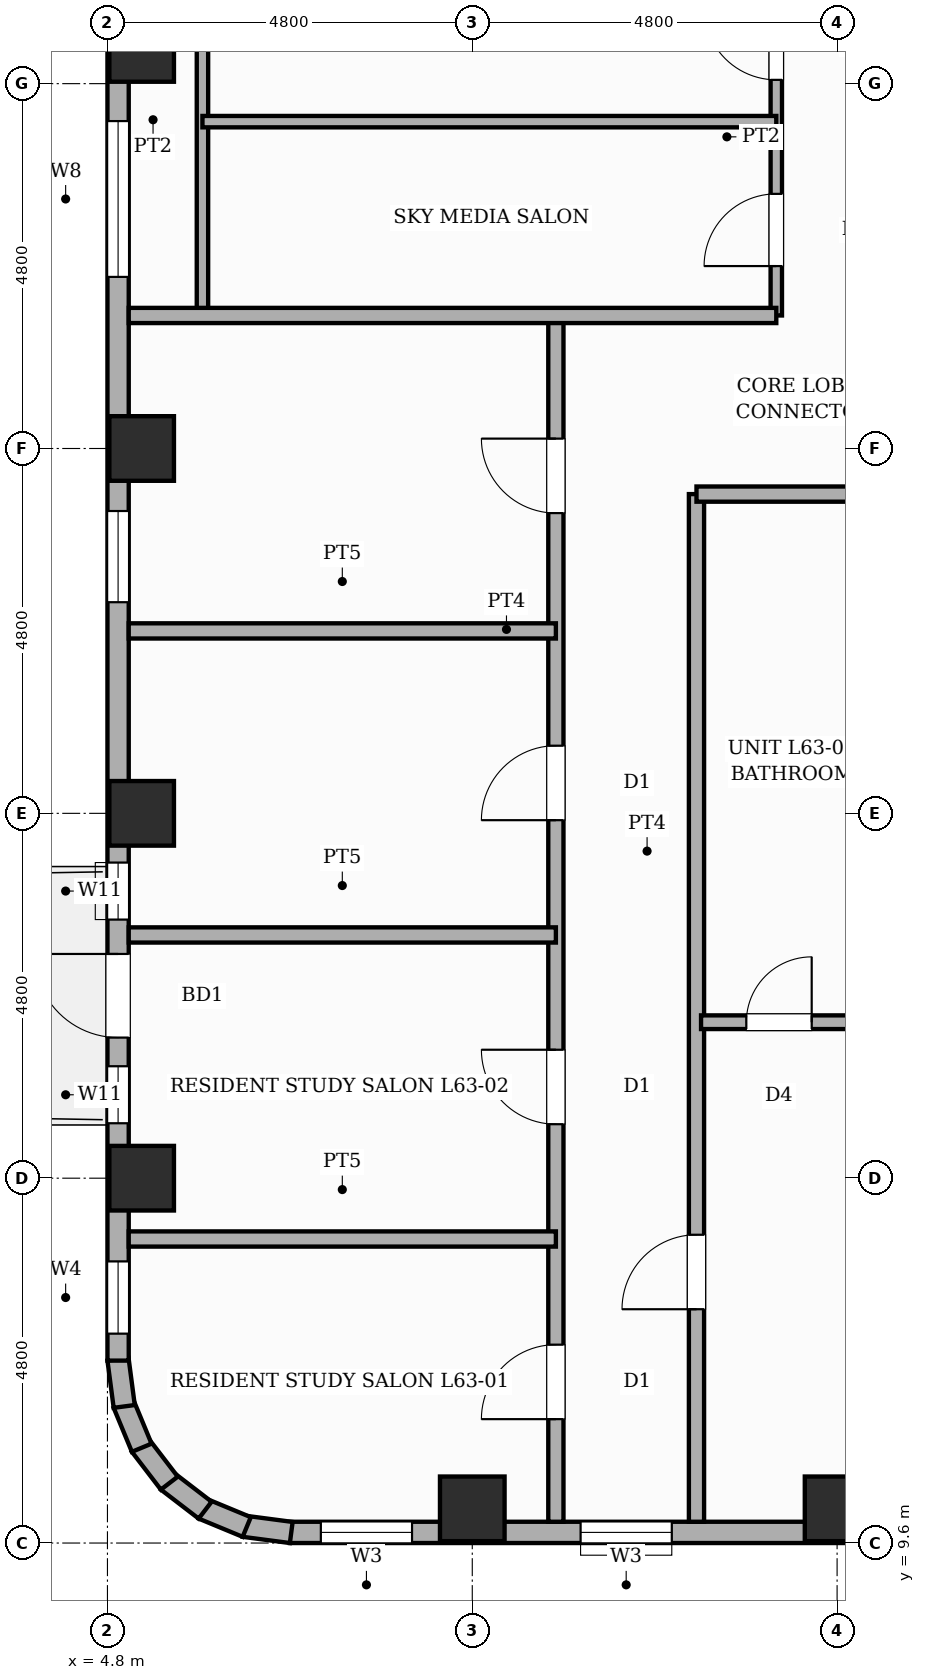
"""IFC4 building model, lengths in metres.
Left out: names, types, materials, properties, quantities, classifications, styles, units other than length and angle.
Written with IfcOpenShell. Run it as: python <this file> out.ifc"""

import sys

from ifc_helpers import new_model, si_unit, direction, frame, frame_2d, origin, origin_2d, place, context, subcontext, project, spatial, rectangle, extrude, element, fill, save


model = new_model("IFC4")
c1 = context("Model", 3, precision=1e-05, world=origin(), true_north=direction((0.0, 1.0)))
c2 = subcontext(c1, "Body", "Model", "MODEL_VIEW")
j1 = project(units=[si_unit("LENGTHUNIT", "METRE"), si_unit("PLANEANGLEUNIT", "RADIAN")], contexts=[c1])
p1 = place(None, origin())
s1 = spatial("IfcSite", under=j1, at=p1, CompositionType="ELEMENT")
p2 = place(p1, origin())
s2 = spatial("IfcBuilding", under=s1, at=p2, CompositionType="ELEMENT")
p3 = place(p2, frame((0.0, 0.0, 239.8)))
s3 = spatial("IfcBuildingStorey", under=s2, at=p3, CompositionType="ELEMENT", Elevation=239.8)
for number, where, z_axis, x_axis in (
    (1, (5.25, 14.4, 0.0), (0.0, 0.0, 1.0), (1.0, 0.0, 0.0)),
    (2, (5.25, 19.2, 0.0), (0.0, 0.0, 1.0), (1.0, 0.0, 0.0)),
    (3, (5.25, 24.0, 0.0), (0.0, 0.0, 1.0), (1.0, 0.0, 0.0)),
    (4, (5.25, 29.25, 0.0), (0.0, 0.0, 1.0), (1.0, 0.0, 0.0)),
    (5, (9.6, 10.05, 0.0), (0.0, 0.0, 1.0), (1.0, 0.0, 0.0)),
    (6, (14.4, 10.05, 0.0), (0.0, 0.0, 1.0), (1.0, 0.0, 0.0)),
):
    element("IfcColumn", number, at=place(p3, frame(where, z_axis=z_axis, x_axis=x_axis)), inside=s3, PredefinedType="COLUMN", context=c2, shape_type="SweptSolid", body=[
        extrude(rectangle(XDim=0.85, YDim=0.85, at=origin_2d()), origin(), (0.0, 0.0, 1.0), 4.3),
    ])
p4 = place(p3, frame((21.6, 9.74, 0.0), z_axis=(0.0, 0.0, 1.0), x_axis=(-1.0, 0.0, 0.0)))
e7 = element("IfcWall", 7, at=p4, inside=s3, PredefinedType="STANDARD", context=c2, shape_type="SweptSolid", body=[
    extrude(rectangle(XDim=14.4, YDim=0.28, at=frame_2d((7.2, 0.0))), origin(), (0.0, 0.0, 1.0), 3.32),
])
p5 = place(p4, frame((9.375, 0.0, 0.8)))
e8 = element("IfcOpeningElement", 8, at=p5, cuts=e7, PredefinedType="OPENING", context=c2, shape_type="SweptSolid", body=[
    extrude(rectangle(XDim=1.2, YDim=1.8, at=frame_2d((0.6, 0.9))), frame((0.0, 0.15, 0.0), z_axis=(0.0, -1.0, 0.0), x_axis=(1.0, 0.0, 0.0)), (0.0, 0.0, 1.0), 0.3),
])
p6 = place(p4, frame((12.792, 0.0, 0.8)))
e9 = element("IfcOpeningElement", 9, at=p6, cuts=e7, PredefinedType="OPENING", context=c2, shape_type="SweptSolid", body=[
    extrude(rectangle(XDim=1.2, YDim=1.8, at=frame_2d((0.6, 0.9))), frame((0.0, 0.15, 0.0), z_axis=(0.0, -1.0, 0.0), x_axis=(1.0, 0.0, 0.0)), (0.0, 0.0, 1.0), 0.3),
])
p7 = place(p4, frame((4.749, 0.0, 0.8)))
e10 = element("IfcOpeningElement", 10, at=p7, cuts=e7, PredefinedType="OPENING", context=c2, shape_type="SweptSolid", body=[
    extrude(rectangle(XDim=1.65, YDim=1.95, at=frame_2d((0.825, 0.975))), frame((0.0, 0.15, 0.0), z_axis=(0.0, -1.0, 0.0), x_axis=(1.0, 0.0, 0.0)), (0.0, 0.0, 1.0), 0.3),
])
p8 = place(p4, frame((0.407, 0.0, 0.8)))
e11 = element("IfcOpeningElement", 11, at=p8, cuts=e7, PredefinedType="OPENING", context=c2, shape_type="SweptSolid", body=[
    extrude(rectangle(XDim=1.2, YDim=1.8, at=frame_2d((0.6, 0.9))), frame((0.0, 0.15, 0.0), z_axis=(0.0, -1.0, 0.0), x_axis=(1.0, 0.0, 0.0)), (0.0, 0.0, 1.0), 0.3),
])
p9 = place(p3, frame((7.218, 9.739, 0.0), z_axis=(0.0, 0.0, 1.0), x_axis=(-0.9914410257, 0.130555323746, 0.0)))
e12 = element("IfcWall", 12, at=p9, inside=s3, PredefinedType="STANDARD", context=c2, shape_type="SweptSolid", body=[
    extrude(rectangle(XDim=0.626, YDim=0.28, at=frame_2d((0.313, 0.0))), origin(), (0.0, 0.0, 1.0), 4.04),
])
p10 = place(p3, frame((6.632, 9.811, 0.0), z_axis=(0.0, 0.0, 1.0), x_axis=(-0.923836271867, 0.382787856107, 0.0)))
e13 = element("IfcWall", 13, at=p10, inside=s3, PredefinedType="STANDARD", context=c2, shape_type="SweptSolid", body=[
    extrude(rectangle(XDim=0.626, YDim=0.28, at=frame_2d((0.313, 0.0))), origin(), (0.0, 0.0, 1.0), 4.04),
])
for number, where, z_axis, x_axis in (
    (14, (6.085, 10.033, 0.0), (0.0, 0.0, 1.0), (-0.793, 0.609, 0.0)),
    (15, (5.614, 10.388, 0.0), (0.0, 0.0, 1.0), (-0.609, 0.793, 0.0)),
    (16, (5.251, 10.854, 0.0), (0.0, 0.0, 1.0), (-0.383, 0.924, 0.0)),
    (17, (5.021, 11.397, 0.0), (0.0, 0.0, 1.0), (-0.131, 0.991, 0.0)),
):
    element("IfcWall", number, at=place(p3, frame(where, z_axis=z_axis, x_axis=x_axis)), inside=s3, PredefinedType="STANDARD", context=c2, shape_type="SweptSolid", body=[
        extrude(rectangle(XDim=0.626, YDim=0.28, at=frame_2d((0.313, 0.0))), origin(), (0.0, 0.0, 1.0), 4.04),
    ])
p11 = place(p3, frame((4.94, 12.0, 0.0), z_axis=(0.0, 0.0, 1.0), x_axis=(0.0, 1.0, 0.0)))
e18 = element("IfcWall", 18, at=p11, inside=s3, PredefinedType="STANDARD", context=c2, shape_type="SweptSolid", body=[
    extrude(rectangle(XDim=33.6, YDim=0.28, at=frame_2d((16.8, 0.0))), origin(), (0.0, 0.0, 1.0), 3.32),
])
p12 = place(p11, frame((4.25, 0.0, 0.0)))
e19 = element("IfcOpeningElement", 19, at=p12, cuts=e18, PredefinedType="OPENING", context=c2, shape_type="SweptSolid", body=[
    extrude(rectangle(XDim=1.1, YDim=2.15, at=frame_2d((0.55, 1.075))), frame((0.0, 0.15, 0.0), z_axis=(0.0, -1.0, 0.0), x_axis=(1.0, 0.0, 0.0)), (0.0, 0.0, 1.0), 0.3),
])
p13 = place(p11, frame((0.355, 0.0, 0.8)))
e20 = element("IfcOpeningElement", 20, at=p13, cuts=e18, PredefinedType="OPENING", context=c2, shape_type="SweptSolid", body=[
    extrude(rectangle(XDim=0.95, YDim=1.8, at=frame_2d((0.475, 0.9))), frame((0.0, 0.15, 0.0), z_axis=(0.0, -1.0, 0.0), x_axis=(1.0, 0.0, 0.0)), (0.0, 0.0, 1.0), 0.3),
])
p14 = place(p11, frame((3.123, 0.0, 0.45)))
e21 = element("IfcOpeningElement", 21, at=p14, cuts=e18, PredefinedType="OPENING", context=c2, shape_type="SweptSolid", body=[
    extrude(rectangle(XDim=0.75, YDim=1.8, at=frame_2d((0.375, 0.9))), frame((0.0, 0.15, 0.0), z_axis=(0.0, -1.0, 0.0), x_axis=(1.0, 0.0, 0.0)), (0.0, 0.0, 1.0), 0.3),
])
p15 = place(p11, frame((5.802, 0.0, 0.45)))
e22 = element("IfcOpeningElement", 22, at=p15, cuts=e18, PredefinedType="OPENING", context=c2, shape_type="SweptSolid", body=[
    extrude(rectangle(XDim=0.75, YDim=1.8, at=frame_2d((0.375, 0.9))), frame((0.0, 0.15, 0.0), z_axis=(0.0, -1.0, 0.0), x_axis=(1.0, 0.0, 0.0)), (0.0, 0.0, 1.0), 0.3),
])
p16 = place(p11, frame((9.978, 0.0, 0.8)))
e23 = element("IfcOpeningElement", 23, at=p16, cuts=e18, PredefinedType="OPENING", context=c2, shape_type="SweptSolid", body=[
    extrude(rectangle(XDim=1.2, YDim=1.8, at=frame_2d((0.6, 0.9))), frame((0.0, 0.15, 0.0), z_axis=(0.0, -1.0, 0.0), x_axis=(1.0, 0.0, 0.0)), (0.0, 0.0, 1.0), 0.3),
])
p17 = place(p11, frame((14.258, 0.0, 0.8)))
e24 = element("IfcOpeningElement", 24, at=p17, cuts=e18, PredefinedType="OPENING", context=c2, shape_type="SweptSolid", body=[
    extrude(rectangle(XDim=2.05, YDim=1.95, at=frame_2d((1.025, 0.975))), frame((0.0, 0.15, 0.0), z_axis=(0.0, -1.0, 0.0), x_axis=(1.0, 0.0, 0.0)), (0.0, 0.0, 1.0), 0.3),
])
p18 = place(p3, frame((13.6, 25.75, 0.0), z_axis=(0.0, 0.0, 1.0), x_axis=(0.0, 1.0, 0.0)))
e25 = element("IfcWall", 25, at=p18, inside=s3, PredefinedType="PARTITIONING", context=c2, shape_type="SweptSolid", body=[
    extrude(rectangle(XDim=5.15, YDim=0.15, at=frame_2d((2.575, 0.0))), origin(), (0.0, 0.0, 1.0), 4.04),
])
p19 = place(p18, frame((0.65, 0.0, 0.0)))
e26 = element("IfcOpeningElement", 26, at=p19, cuts=e25, PredefinedType="OPENING", context=c2, shape_type="SweptSolid", body=[
    extrude(rectangle(XDim=0.95, YDim=2.15, at=frame_2d((0.475, 1.075))), frame((0.0, 0.085, 0.0), z_axis=(0.0, -1.0, 0.0), x_axis=(1.0, 0.0, 0.0)), (0.0, 0.0, 1.0), 0.17),
])
p20 = place(p18, frame((3.1, 0.0, 0.0)))
e27 = element("IfcOpeningElement", 27, at=p20, cuts=e25, PredefinedType="OPENING", context=c2, shape_type="SweptSolid", body=[
    extrude(rectangle(XDim=0.95, YDim=2.15, at=frame_2d((0.475, 1.075))), frame((0.0, 0.085, 0.0), z_axis=(0.0, -1.0, 0.0), x_axis=(1.0, 0.0, 0.0)), (0.0, 0.0, 1.0), 0.17),
])
p21 = place(p3, frame((6.05, 25.75, 0.0), z_axis=(0.0, 0.0, 1.0), x_axis=(0.0, 1.0, 0.0)))
e28 = element("IfcWall", 28, at=p21, inside=s3, PredefinedType="PARTITIONING", context=c2, shape_type="SweptSolid", body=[
    extrude(rectangle(XDim=5.15, YDim=0.15, at=frame_2d((2.575, 0.0))), origin(), (0.0, 0.0, 1.0), 4.04),
])
p22 = place(p3, frame((6.05, 28.3, 0.0), z_axis=(0.0, 0.0, 1.0), x_axis=(1.0, 0.0, 0.0)))
e29 = element("IfcWall", 29, at=p22, inside=s3, PredefinedType="PARTITIONING", context=c2, shape_type="SweptSolid", body=[
    extrude(rectangle(XDim=7.55, YDim=0.15, at=frame_2d((3.775, 0.0))), origin(), (0.0, 0.0, 1.0), 4.04),
])
p23 = place(p3, frame((10.7, 9.88, 0.0), z_axis=(0.0, 0.0, 1.0), x_axis=(0.0, 1.0, 0.0)))
e30 = element("IfcWall", 30, at=p23, inside=s3, PredefinedType="PARTITIONING", context=c2, shape_type="SweptSolid", body=[
    extrude(rectangle(XDim=15.87, YDim=0.2, at=frame_2d((7.935, 0.0))), origin(), (0.0, 0.0, 1.0), 4.04),
])
p24 = place(p23, frame((1.35, 0.0, 0.0)))
e31 = element("IfcOpeningElement", 31, at=p24, cuts=e30, PredefinedType="OPENING", context=c2, shape_type="SweptSolid", body=[
    extrude(rectangle(XDim=0.98, YDim=2.18, at=frame_2d((0.49, 1.09))), frame((0.0, 0.11, 0.0), z_axis=(0.0, -1.0, 0.0), x_axis=(1.0, 0.0, 0.0)), (0.0, 0.0, 1.0), 0.22),
])
p25 = place(p23, frame((5.23, 0.0, 0.0)))
e32 = element("IfcOpeningElement", 32, at=p25, cuts=e30, PredefinedType="OPENING", context=c2, shape_type="SweptSolid", body=[
    extrude(rectangle(XDim=0.98, YDim=2.18, at=frame_2d((0.49, 1.09))), frame((0.0, 0.11, 0.0), z_axis=(0.0, -1.0, 0.0), x_axis=(1.0, 0.0, 0.0)), (0.0, 0.0, 1.0), 0.22),
])
p26 = place(p23, frame((9.23, 0.0, 0.0)))
e33 = element("IfcOpeningElement", 33, at=p26, cuts=e30, PredefinedType="OPENING", context=c2, shape_type="SweptSolid", body=[
    extrude(rectangle(XDim=0.98, YDim=2.18, at=frame_2d((0.49, 1.09))), frame((0.0, 0.11, 0.0), z_axis=(0.0, -1.0, 0.0), x_axis=(1.0, 0.0, 0.0)), (0.0, 0.0, 1.0), 0.22),
])
p27 = place(p23, frame((13.27, 0.0, 0.0)))
e34 = element("IfcOpeningElement", 34, at=p27, cuts=e30, PredefinedType="OPENING", context=c2, shape_type="SweptSolid", body=[
    extrude(rectangle(XDim=0.98, YDim=2.18, at=frame_2d((0.49, 1.09))), frame((0.0, 0.11, 0.0), z_axis=(0.0, -1.0, 0.0), x_axis=(1.0, 0.0, 0.0)), (0.0, 0.0, 1.0), 0.22),
])
p28 = place(p3, frame((12.55, 9.88, 0.0), z_axis=(0.0, 0.0, 1.0), x_axis=(0.0, 1.0, 0.0)))
e35 = element("IfcWall", 35, at=p28, inside=s3, PredefinedType="PARTITIONING", context=c2, shape_type="SweptSolid", body=[
    extrude(rectangle(XDim=13.52, YDim=0.2, at=frame_2d((6.76, 0.0))), origin(), (0.0, 0.0, 1.0), 4.04),
])
p29 = place(p28, frame((2.796, 0.0, 0.0)))
e36 = element("IfcOpeningElement", 36, at=p29, cuts=e35, PredefinedType="OPENING", context=c2, shape_type="SweptSolid", body=[
    extrude(rectangle(XDim=0.98, YDim=2.18, at=frame_2d((0.49, 1.09))), frame((0.0, 0.11, 0.0), z_axis=(0.0, -1.0, 0.0), x_axis=(1.0, 0.0, 0.0)), (0.0, 0.0, 1.0), 0.22),
])
p30 = place(p3, frame((12.55, 23.4, 0.0), z_axis=(0.0, 0.0, 1.0), x_axis=(1.0, 0.0, 0.0)))
e37 = element("IfcWall", 37, at=p30, inside=s3, PredefinedType="PARTITIONING", context=c2, shape_type="SweptSolid", body=[
    extrude(rectangle(XDim=11.17, YDim=0.2, at=frame_2d((5.585, 0.0))), origin(), (0.0, 0.0, 1.0), 4.04),
])
p31 = place(p3, frame((5.08, 25.75, 0.0), z_axis=(0.0, 0.0, 1.0), x_axis=(1.0, 0.0, 0.0)))
e38 = element("IfcWall", 38, at=p31, inside=s3, PredefinedType="PARTITIONING", context=c2, shape_type="SweptSolid", body=[
    extrude(rectangle(XDim=8.52, YDim=0.2, at=frame_2d((4.26, 0.0))), origin(), (0.0, 0.0, 1.0), 4.04),
])
for number, where, z_axis, x_axis in (
    (39, (5.08, 13.6, 0.0), (0.0, 0.0, 1.0), (1.0, 0.0, 0.0)),
    (40, (5.08, 17.6, 0.0), (0.0, 0.0, 1.0), (1.0, 0.0, 0.0)),
):
    element("IfcWall", number, at=place(p3, frame(where, z_axis=z_axis, x_axis=x_axis)), inside=s3, PredefinedType="SOLIDWALL", context=c2, shape_type="SweptSolid", body=[
        extrude(rectangle(XDim=5.62, YDim=0.2, at=frame_2d((2.81, 0.0))), origin(), (0.0, 0.0, 1.0), 4.04),
    ])
p32 = place(p3, frame((5.08, 21.6, 0.0), z_axis=(0.0, 0.0, 1.0), x_axis=(1.0, 0.0, 0.0)))
e41 = element("IfcWall", 41, at=p32, inside=s3, PredefinedType="SOLIDWALL", context=c2, shape_type="SweptSolid", body=[
    extrude(rectangle(XDim=5.62, YDim=0.2, at=frame_2d((2.81, 0.0))), origin(), (0.0, 0.0, 1.0), 3.72),
])
p33 = place(p3, frame((12.61, 16.452, 0.0), z_axis=(0.0, 0.0, 1.0), x_axis=(1.0, 0.0, 0.0)))
e42 = element("IfcWall", 42, at=p33, inside=s3, PredefinedType="PLUMBINGWALL", context=c2, shape_type="SweptSolid", body=[
    extrude(rectangle(XDim=11.11, YDim=0.18, at=frame_2d((5.555, 0.0))), origin(), (0.0, 0.0, 1.0), 4.04),
])
p34 = place(p33, frame((0.596, 0.0, 0.0)))
e43 = element("IfcOpeningElement", 43, at=p34, cuts=e42, PredefinedType="OPENING", context=c2, shape_type="SweptSolid", body=[
    extrude(rectangle(XDim=0.86, YDim=2.1, at=frame_2d((0.43, 1.05))), frame((0.0, 0.1, 0.0), z_axis=(0.0, -1.0, 0.0), x_axis=(1.0, 0.0, 0.0)), (0.0, 0.0, 1.0), 0.2),
])
p35 = place(p33, frame((3.391, 0.0, 0.0)))
e44 = element("IfcOpeningElement", 44, at=p35, cuts=e42, PredefinedType="OPENING", context=c2, shape_type="SweptSolid", body=[
    extrude(rectangle(XDim=0.9, YDim=2.15, at=frame_2d((0.45, 1.075))), frame((0.0, 0.1, 0.0), z_axis=(0.0, -1.0, 0.0), x_axis=(1.0, 0.0, 0.0)), (0.0, 0.0, 1.0), 0.2),
])
p36 = place(p33, frame((8.234, 0.0, 0.0)))
e45 = element("IfcOpeningElement", 45, at=p36, cuts=e42, PredefinedType="OPENING", context=c2, shape_type="SweptSolid", body=[
    extrude(rectangle(XDim=0.9, YDim=2.15, at=frame_2d((0.45, 1.075))), frame((0.0, 0.1, 0.0), z_axis=(0.0, -1.0, 0.0), x_axis=(1.0, 0.0, 0.0)), (0.0, 0.0, 1.0), 0.2),
])
p37 = place(p5, origin())
e46 = element("IfcWindow", 46, at=p37, inside=s3, PartitioningType="SINGLE_PANEL", PredefinedType="WINDOW", context=c2, shape_type="SweptSolid", body=[
    extrude(rectangle(XDim=1.2, YDim=1.8, at=frame_2d((0.6, 0.9))), frame((0.0, 0.03, 0.0), z_axis=(0.0, -1.0, 0.0), x_axis=(1.0, 0.0, 0.0)), (0.0, 0.0, 1.0), 0.06),
])
fill(e8, e46)
p38 = place(p6, origin())
e47 = element("IfcWindow", 47, at=p38, inside=s3, PartitioningType="SINGLE_PANEL", PredefinedType="WINDOW", context=c2, shape_type="SweptSolid", body=[
    extrude(rectangle(XDim=1.2, YDim=1.8, at=frame_2d((0.6, 0.9))), frame((0.0, 0.03, 0.0), z_axis=(0.0, -1.0, 0.0), x_axis=(1.0, 0.0, 0.0)), (0.0, 0.0, 1.0), 0.06),
])
fill(e9, e47)
p39 = place(p12, origin())
e48 = element("IfcDoor", 48, at=p39, inside=s3, OperationType="SINGLE_SWING_RIGHT", PredefinedType="DOOR", context=c2, shape_type="SweptSolid", body=[
    extrude(rectangle(XDim=1.1, YDim=2.15, at=frame_2d((0.55, 1.075))), frame((0.0, 0.025, 0.0), z_axis=(0.0, -1.0, 0.0), x_axis=(1.0, 0.0, 0.0)), (0.0, 0.0, 1.0), 0.05),
])
fill(e19, e48)
p40 = place(p13, origin())
e49 = element("IfcWindow", 49, at=p40, inside=s3, PartitioningType="SINGLE_PANEL", PredefinedType="WINDOW", context=c2, shape_type="SweptSolid", body=[
    extrude(rectangle(XDim=0.95, YDim=1.8, at=frame_2d((0.475, 0.9))), frame((0.0, 0.03, 0.0), z_axis=(0.0, -1.0, 0.0), x_axis=(1.0, 0.0, 0.0)), (0.0, 0.0, 1.0), 0.06),
])
fill(e20, e49)
p41 = place(p14, origin())
e50 = element("IfcWindow", 50, at=p41, inside=s3, PartitioningType="SINGLE_PANEL", PredefinedType="WINDOW", context=c2, shape_type="SweptSolid", body=[
    extrude(rectangle(XDim=0.75, YDim=1.8, at=frame_2d((0.375, 0.9))), frame((0.0, 0.03, 0.0), z_axis=(0.0, -1.0, 0.0), x_axis=(1.0, 0.0, 0.0)), (0.0, 0.0, 1.0), 0.06),
])
fill(e21, e50)
p42 = place(p15, origin())
e51 = element("IfcWindow", 51, at=p42, inside=s3, PartitioningType="SINGLE_PANEL", PredefinedType="WINDOW", context=c2, shape_type="SweptSolid", body=[
    extrude(rectangle(XDim=0.75, YDim=1.8, at=frame_2d((0.375, 0.9))), frame((0.0, 0.03, 0.0), z_axis=(0.0, -1.0, 0.0), x_axis=(1.0, 0.0, 0.0)), (0.0, 0.0, 1.0), 0.06),
])
fill(e22, e51)
p43 = place(p16, origin())
e52 = element("IfcWindow", 52, at=p43, inside=s3, PartitioningType="SINGLE_PANEL", PredefinedType="WINDOW", context=c2, shape_type="SweptSolid", body=[
    extrude(rectangle(XDim=1.2, YDim=1.8, at=frame_2d((0.6, 0.9))), frame((0.0, 0.03, 0.0), z_axis=(0.0, -1.0, 0.0), x_axis=(1.0, 0.0, 0.0)), (0.0, 0.0, 1.0), 0.06),
])
fill(e23, e52)
p44 = place(p17, origin())
e53 = element("IfcWindow", 53, at=p44, inside=s3, PartitioningType="SINGLE_PANEL", PredefinedType="WINDOW", context=c2, shape_type="SweptSolid", body=[
    extrude(rectangle(XDim=2.05, YDim=1.95, at=frame_2d((1.025, 0.975))), frame((0.0, 0.03, 0.0), z_axis=(0.0, -1.0, 0.0), x_axis=(1.0, 0.0, 0.0)), (0.0, 0.0, 1.0), 0.06),
])
fill(e24, e53)
p45 = place(p19, origin())
e54 = element("IfcDoor", 54, at=p45, inside=s3, OperationType="SINGLE_SWING_LEFT", PredefinedType="DOOR", context=c2, shape_type="SweptSolid", body=[
    extrude(rectangle(XDim=0.95, YDim=2.15, at=frame_2d((0.475, 1.075))), frame((0.0, 0.025, 0.0), z_axis=(0.0, -1.0, 0.0), x_axis=(1.0, 0.0, 0.0)), (0.0, 0.0, 1.0), 0.05),
])
fill(e26, e54)
p46 = place(p20, origin())
e55 = element("IfcDoor", 55, at=p46, inside=s3, OperationType="SINGLE_SWING_RIGHT", PredefinedType="DOOR", context=c2, shape_type="SweptSolid", body=[
    extrude(rectangle(XDim=0.95, YDim=2.15, at=frame_2d((0.475, 1.075))), frame((0.0, 0.025, 0.0), z_axis=(0.0, -1.0, 0.0), x_axis=(1.0, 0.0, 0.0)), (0.0, 0.0, 1.0), 0.05),
])
fill(e27, e55)
p47 = place(p24, origin())
e56 = element("IfcDoor", 56, at=p47, inside=s3, OperationType="SINGLE_SWING_LEFT", PredefinedType="DOOR", context=c2, shape_type="SweptSolid", body=[
    extrude(rectangle(XDim=0.98, YDim=2.18, at=frame_2d((0.49, 1.09))), frame((0.0, 0.025, 0.0), z_axis=(0.0, -1.0, 0.0), x_axis=(1.0, 0.0, 0.0)), (0.0, 0.0, 1.0), 0.05),
])
fill(e31, e56)
p48 = place(p25, origin())
e57 = element("IfcDoor", 57, at=p48, inside=s3, OperationType="SINGLE_SWING_RIGHT", PredefinedType="DOOR", context=c2, shape_type="SweptSolid", body=[
    extrude(rectangle(XDim=0.98, YDim=2.18, at=frame_2d((0.49, 1.09))), frame((0.0, 0.025, 0.0), z_axis=(0.0, -1.0, 0.0), x_axis=(1.0, 0.0, 0.0)), (0.0, 0.0, 1.0), 0.05),
])
fill(e32, e57)
p49 = place(p26, origin())
e58 = element("IfcDoor", 58, at=p49, inside=s3, OperationType="SINGLE_SWING_LEFT", PredefinedType="DOOR", context=c2, shape_type="SweptSolid", body=[
    extrude(rectangle(XDim=0.98, YDim=2.18, at=frame_2d((0.49, 1.09))), frame((0.0, 0.025, 0.0), z_axis=(0.0, -1.0, 0.0), x_axis=(1.0, 0.0, 0.0)), (0.0, 0.0, 1.0), 0.05),
])
fill(e33, e58)
p50 = place(p27, origin())
e59 = element("IfcDoor", 59, at=p50, inside=s3, OperationType="SINGLE_SWING_RIGHT", PredefinedType="DOOR", context=c2, shape_type="SweptSolid", body=[
    extrude(rectangle(XDim=0.98, YDim=2.18, at=frame_2d((0.49, 1.09))), frame((0.0, 0.025, 0.0), z_axis=(0.0, -1.0, 0.0), x_axis=(1.0, 0.0, 0.0)), (0.0, 0.0, 1.0), 0.05),
])
fill(e34, e59)
p51 = place(p29, origin())
e60 = element("IfcDoor", 60, at=p51, inside=s3, OperationType="SINGLE_SWING_LEFT", PredefinedType="DOOR", context=c2, shape_type="SweptSolid", body=[
    extrude(rectangle(XDim=0.98, YDim=2.18, at=frame_2d((0.49, 1.09))), frame((0.0, 0.025, 0.0), z_axis=(0.0, -1.0, 0.0), x_axis=(1.0, 0.0, 0.0)), (0.0, 0.0, 1.0), 0.05),
])
fill(e36, e60)
p52 = place(p34, origin())
e61 = element("IfcDoor", 61, at=p52, inside=s3, OperationType="SINGLE_SWING_RIGHT", PredefinedType="DOOR", context=c2, shape_type="SweptSolid", body=[
    extrude(rectangle(XDim=0.86, YDim=2.1, at=frame_2d((0.43, 1.05))), frame((0.0, 0.025, 0.0), z_axis=(0.0, -1.0, 0.0), x_axis=(1.0, 0.0, 0.0)), (0.0, 0.0, 1.0), 0.05),
])
fill(e43, e61)
save(model, sys.argv[1])
